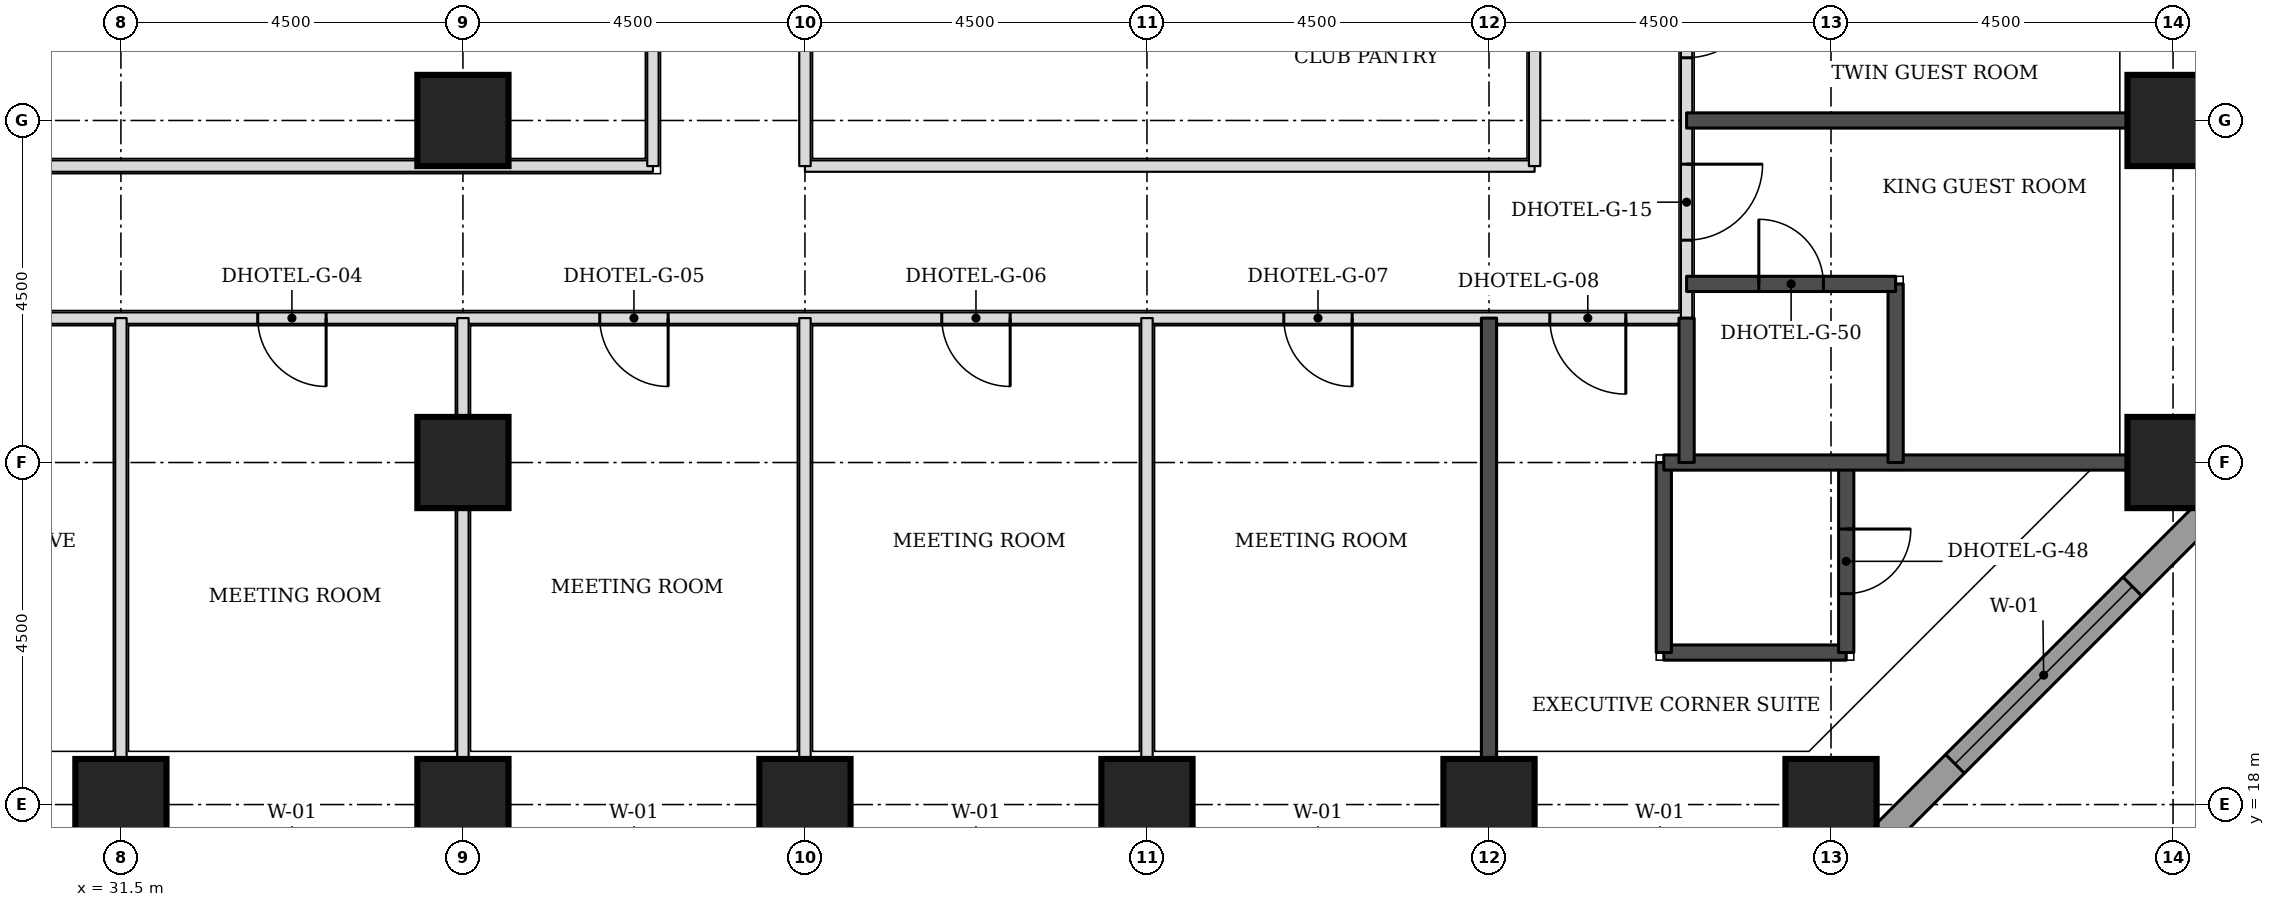
"""IFC4 building model, lengths in metres.
Left out: names, types, materials, properties, quantities, classifications, styles, units other than length and angle.
Written with IfcOpenShell. Run it as: python <this file> out.ifc"""

import sys

from ifc_helpers import new_model, si_unit, direction, frame, frame_2d, origin, origin_2d, place, context, subcontext, project, spatial, rectangle, extrude, element, fill, save


model = new_model("IFC4")
c1 = context("Model", 3, precision=1e-05, world=origin(), true_north=direction((0.0, 1.0)))
c2 = subcontext(c1, "Body", "Model", "MODEL_VIEW")
j1 = project(units=[si_unit("LENGTHUNIT", "METRE"), si_unit("PLANEANGLEUNIT", "RADIAN")], contexts=[c1])
p1 = place(None, origin())
s1 = spatial("IfcSite", under=j1, at=p1, CompositionType="ELEMENT")
p2 = place(p1, origin())
s2 = spatial("IfcBuilding", under=s1, at=p2, CompositionType="ELEMENT")
p3 = place(p2, frame((0.0, 0.0, 66.0)))
s3 = spatial("IfcBuildingStorey", under=s2, at=p3, CompositionType="ELEMENT", Elevation=66.0)
for number, where, z_axis, x_axis in (
    (1, (31.5, 18.0, 0.0), (0.0, 0.0, 1.0), (1.0, 0.0, 0.0)),
    (2, (36.0, 18.0, 0.0), (0.0, 0.0, 1.0), (1.0, 0.0, 0.0)),
    (3, (40.5, 18.0, 0.0), (0.0, 0.0, 1.0), (1.0, 0.0, 0.0)),
    (4, (45.0, 18.0, 0.0), (0.0, 0.0, 1.0), (1.0, 0.0, 0.0)),
    (5, (49.5, 18.0, 0.0), (0.0, 0.0, 1.0), (1.0, 0.0, 0.0)),
    (6, (54.0, 18.0, 0.0), (0.0, 0.0, 1.0), (1.0, 0.0, 0.0)),
    (7, (36.0, 22.5, 0.0), (0.0, 0.0, 1.0), (1.0, 0.0, 0.0)),
    (8, (58.5, 22.5, 0.0), (0.0, 0.0, 1.0), (1.0, 0.0, 0.0)),
    (9, (36.0, 27.0, 0.0), (0.0, 0.0, 1.0), (1.0, 0.0, 0.0)),
    (10, (58.5, 27.0, 0.0), (0.0, 0.0, 1.0), (1.0, 0.0, 0.0)),
):
    element("IfcColumn", number, at=place(p3, frame(where, z_axis=z_axis, x_axis=x_axis)), inside=s3, PredefinedType="COLUMN", context=c2, shape_type="SweptSolid", body=[
        extrude(rectangle(XDim=1.2, YDim=1.2, at=origin_2d()), origin(), (0.0, 0.0, 1.0), 3.3),
    ])
p4 = place(p3, frame((54.27, 17.174, 0.0), z_axis=(0.0, 0.0, 1.0), x_axis=(0.707106781187, 0.707106781187, 0.0)))
e11 = element("IfcWall", 11, at=p4, inside=s3, PredefinedType="STANDARD", context=c2, shape_type="SweptSolid", body=[
    extrude(rectangle(XDim=7.151, YDim=0.35, at=frame_2d((3.576, 0.0))), origin(), (0.0, 0.0, 1.0), 3.055),
])
p5 = place(p4, frame((1.926, 0.0, 0.8)))
e12 = element("IfcOpeningElement", 12, at=p5, cuts=e11, PredefinedType="OPENING", context=c2, shape_type="SweptSolid", body=[
    extrude(rectangle(XDim=3.3, YDim=1.5, at=frame_2d((1.65, 0.75))), frame((0.0, 0.185, 0.0), z_axis=(0.0, -1.0, 0.0), x_axis=(1.0, 0.0, 0.0)), (0.0, 0.0, 1.0), 0.37),
])
p6 = place(p3, frame((19.9, 24.4, 0.0), z_axis=(0.0, 0.0, 1.0), x_axis=(1.0, 0.0, 0.0)))
e13 = element("IfcWall", 13, at=p6, inside=s3, PredefinedType="PARTITIONING", context=c2, shape_type="SweptSolid", body=[
    extrude(rectangle(XDim=32.2, YDim=0.15, at=frame_2d((16.1, 0.0))), origin(), (0.0, 0.0, 1.0), 3.08),
])
p7 = place(p6, frame((4.4, 0.0, 0.0)))
e14 = element("IfcOpeningElement", 14, at=p7, cuts=e13, PredefinedType="OPENING", context=c2, shape_type="SweptSolid", body=[
    extrude(rectangle(XDim=0.9, YDim=2.1, at=frame_2d((0.45, 1.05))), frame((0.0, 0.085, 0.0), z_axis=(0.0, -1.0, 0.0), x_axis=(1.0, 0.0, 0.0)), (0.0, 0.0, 1.0), 0.17),
])
p8 = place(p6, frame((8.9, 0.0, 0.0)))
e15 = element("IfcOpeningElement", 15, at=p8, cuts=e13, PredefinedType="OPENING", context=c2, shape_type="SweptSolid", body=[
    extrude(rectangle(XDim=0.9, YDim=2.1, at=frame_2d((0.45, 1.05))), frame((0.0, 0.085, 0.0), z_axis=(0.0, -1.0, 0.0), x_axis=(1.0, 0.0, 0.0)), (0.0, 0.0, 1.0), 0.17),
])
p9 = place(p6, frame((13.4, 0.0, 0.0)))
e16 = element("IfcOpeningElement", 16, at=p9, cuts=e13, PredefinedType="OPENING", context=c2, shape_type="SweptSolid", body=[
    extrude(rectangle(XDim=0.9, YDim=2.1, at=frame_2d((0.45, 1.05))), frame((0.0, 0.085, 0.0), z_axis=(0.0, -1.0, 0.0), x_axis=(1.0, 0.0, 0.0)), (0.0, 0.0, 1.0), 0.17),
])
p10 = place(p6, frame((17.9, 0.0, 0.0)))
e17 = element("IfcOpeningElement", 17, at=p10, cuts=e13, PredefinedType="OPENING", context=c2, shape_type="SweptSolid", body=[
    extrude(rectangle(XDim=0.9, YDim=2.1, at=frame_2d((0.45, 1.05))), frame((0.0, 0.085, 0.0), z_axis=(0.0, -1.0, 0.0), x_axis=(1.0, 0.0, 0.0)), (0.0, 0.0, 1.0), 0.17),
])
p11 = place(p6, frame((22.4, 0.0, 0.0)))
e18 = element("IfcOpeningElement", 18, at=p11, cuts=e13, PredefinedType="OPENING", context=c2, shape_type="SweptSolid", body=[
    extrude(rectangle(XDim=0.9, YDim=2.1, at=frame_2d((0.45, 1.05))), frame((0.0, 0.085, 0.0), z_axis=(0.0, -1.0, 0.0), x_axis=(1.0, 0.0, 0.0)), (0.0, 0.0, 1.0), 0.17),
])
p12 = place(p6, frame((26.9, 0.0, 0.0)))
e19 = element("IfcOpeningElement", 19, at=p12, cuts=e13, PredefinedType="OPENING", context=c2, shape_type="SweptSolid", body=[
    extrude(rectangle(XDim=0.9, YDim=2.1, at=frame_2d((0.45, 1.05))), frame((0.0, 0.085, 0.0), z_axis=(0.0, -1.0, 0.0), x_axis=(1.0, 0.0, 0.0)), (0.0, 0.0, 1.0), 0.17),
])
p13 = place(p6, frame((0.8, 0.0, 0.0)))
e20 = element("IfcOpeningElement", 20, at=p13, cuts=e13, PredefinedType="OPENING", context=c2, shape_type="SweptSolid", body=[
    extrude(rectangle(XDim=1.0, YDim=2.1, at=frame_2d((0.5, 1.05))), frame((0.0, 0.085, 0.0), z_axis=(0.0, -1.0, 0.0), x_axis=(1.0, 0.0, 0.0)), (0.0, 0.0, 1.0), 0.17),
])
p14 = place(p6, frame((30.4, 0.0, 0.0)))
e21 = element("IfcOpeningElement", 21, at=p14, cuts=e13, PredefinedType="OPENING", context=c2, shape_type="SweptSolid", body=[
    extrude(rectangle(XDim=1.0, YDim=2.1, at=frame_2d((0.5, 1.05))), frame((0.0, 0.085, 0.0), z_axis=(0.0, -1.0, 0.0), x_axis=(1.0, 0.0, 0.0)), (0.0, 0.0, 1.0), 0.17),
])
p15 = place(p3, frame((52.1, 24.4, 0.0), z_axis=(0.0, 0.0, 1.0), x_axis=(0.0, 1.0, 0.0)))
e22 = element("IfcWall", 22, at=p15, inside=s3, PredefinedType="PARTITIONING", context=c2, shape_type="SweptSolid", body=[
    extrude(rectangle(XDim=23.1, YDim=0.15, at=frame_2d((11.55, 0.0))), origin(), (0.0, 0.0, 1.0), 3.08),
])
p16 = place(p15, frame((1.025, 0.0, 0.0)))
e23 = element("IfcOpeningElement", 23, at=p16, cuts=e22, PredefinedType="OPENING", context=c2, shape_type="SweptSolid", body=[
    extrude(rectangle(XDim=1.0, YDim=2.1, at=frame_2d((0.5, 1.05))), frame((0.0, 0.085, 0.0), z_axis=(0.0, -1.0, 0.0), x_axis=(1.0, 0.0, 0.0)), (0.0, 0.0, 1.0), 0.17),
])
p17 = place(p15, frame((3.425, 0.0, 0.0)))
e24 = element("IfcOpeningElement", 24, at=p17, cuts=e22, PredefinedType="OPENING", context=c2, shape_type="SweptSolid", body=[
    extrude(rectangle(XDim=1.0, YDim=2.1, at=frame_2d((0.5, 1.05))), frame((0.0, 0.085, 0.0), z_axis=(0.0, -1.0, 0.0), x_axis=(1.0, 0.0, 0.0)), (0.0, 0.0, 1.0), 0.17),
])
p18 = place(p15, frame((10.025, 0.0, 0.0)))
e25 = element("IfcOpeningElement", 25, at=p18, cuts=e22, PredefinedType="OPENING", context=c2, shape_type="SweptSolid", body=[
    extrude(rectangle(XDim=1.0, YDim=2.1, at=frame_2d((0.5, 1.05))), frame((0.0, 0.085, 0.0), z_axis=(0.0, -1.0, 0.0), x_axis=(1.0, 0.0, 0.0)), (0.0, 0.0, 1.0), 0.17),
])
p19 = place(p15, frame((12.425, 0.0, 0.0)))
e26 = element("IfcOpeningElement", 26, at=p19, cuts=e22, PredefinedType="OPENING", context=c2, shape_type="SweptSolid", body=[
    extrude(rectangle(XDim=1.0, YDim=2.1, at=frame_2d((0.5, 1.05))), frame((0.0, 0.085, 0.0), z_axis=(0.0, -1.0, 0.0), x_axis=(1.0, 0.0, 0.0)), (0.0, 0.0, 1.0), 0.17),
])
p20 = place(p15, frame((19.15, 0.0, 0.0)))
e27 = element("IfcOpeningElement", 27, at=p20, cuts=e22, PredefinedType="OPENING", context=c2, shape_type="SweptSolid", body=[
    extrude(rectangle(XDim=0.9, YDim=2.1, at=frame_2d((0.45, 1.05))), frame((0.0, 0.085, 0.0), z_axis=(0.0, -1.0, 0.0), x_axis=(1.0, 0.0, 0.0)), (0.0, 0.0, 1.0), 0.17),
])
p21 = place(p3, frame((27.0, 26.4, 0.0), z_axis=(0.0, 0.0, 1.0), x_axis=(1.0, 0.0, 0.0)))
e28 = element("IfcWall", 28, at=p21, inside=s3, PredefinedType="PARTITIONING", context=c2, shape_type="SweptSolid", body=[
    extrude(rectangle(XDim=11.5, YDim=0.15, at=frame_2d((5.75, 0.0))), origin(), (0.0, 0.0, 1.0), 3.08),
])
p22 = place(p3, frame((38.5, 26.4, 0.0), z_axis=(0.0, 0.0, 1.0), x_axis=(0.0, 1.0, 0.0)))
e29 = element("IfcWall", 29, at=p22, inside=s3, PredefinedType="PARTITIONING", context=c2, shape_type="SweptSolid", body=[
    extrude(rectangle(XDim=14.1, YDim=0.15, at=frame_2d((7.05, 0.0))), origin(), (0.0, 0.0, 1.0), 3.08),
])
p23 = place(p22, frame((6.6, 0.0, 0.0)))
e30 = element("IfcOpeningElement", 30, at=p23, cuts=e29, PredefinedType="OPENING", context=c2, shape_type="SweptSolid", body=[
    extrude(rectangle(XDim=0.9, YDim=2.1, at=frame_2d((0.45, 1.05))), frame((0.0, 0.085, 0.0), z_axis=(0.0, -1.0, 0.0), x_axis=(1.0, 0.0, 0.0)), (0.0, 0.0, 1.0), 0.17),
])
p24 = place(p3, frame((40.5, 26.4, 0.0), z_axis=(0.0, 0.0, 1.0), x_axis=(1.0, 0.0, 0.0)))
e31 = element("IfcWall", 31, at=p24, inside=s3, PredefinedType="PARTITIONING", context=c2, shape_type="SweptSolid", body=[
    extrude(rectangle(XDim=9.6, YDim=0.15, at=frame_2d((4.8, 0.0))), origin(), (0.0, 0.0, 1.0), 3.08),
])
for number, where, z_axis, x_axis in (
    (32, (40.5, 26.4, 0.0), (0.0, 0.0, 1.0), (0.0, 1.0, 0.0)),
    (33, (50.1, 26.4, 0.0), (0.0, 0.0, 1.0), (0.0, 1.0, 0.0)),
):
    element("IfcWall", number, at=place(p3, frame(where, z_axis=z_axis, x_axis=x_axis)), inside=s3, PredefinedType="PARTITIONING", context=c2, shape_type="SweptSolid", body=[
        extrude(rectangle(XDim=3.1, YDim=0.15, at=frame_2d((1.55, 0.0))), origin(), (0.0, 0.0, 1.0), 3.08),
    ])
p25 = place(p3, frame((49.5, 18.6, 0.0), z_axis=(0.0, 0.0, 1.0), x_axis=(0.0, 1.0, 0.0)))
e34 = element("IfcWall", 34, at=p25, inside=s3, PredefinedType="SOLIDWALL", context=c2, shape_type="SweptSolid", body=[
    extrude(rectangle(XDim=5.8, YDim=0.2, at=frame_2d((2.9, 0.0))), origin(), (0.0, 0.0, 1.0), 3.08),
])
p26 = place(p3, frame((51.8, 20.0, 0.0), z_axis=(0.0, 0.0, 1.0), x_axis=(1.0, 0.0, 0.0)))
e35 = element("IfcWall", 35, at=p26, inside=s3, PredefinedType="SOLIDWALL", context=c2, shape_type="SweptSolid", body=[
    extrude(rectangle(XDim=2.4, YDim=0.2, at=frame_2d((1.2, 0.0))), origin(), (0.0, 0.0, 1.0), 3.08),
])
p27 = place(p3, frame((51.8, 20.0, 0.0), z_axis=(0.0, 0.0, 1.0), x_axis=(0.0, 1.0, 0.0)))
e36 = element("IfcWall", 36, at=p27, inside=s3, PredefinedType="SOLIDWALL", context=c2, shape_type="SweptSolid", body=[
    extrude(rectangle(XDim=2.5, YDim=0.2, at=frame_2d((1.25, 0.0))), origin(), (0.0, 0.0, 1.0), 3.08),
])
p28 = place(p3, frame((54.2, 20.0, 0.0), z_axis=(0.0, 0.0, 1.0), x_axis=(0.0, 1.0, 0.0)))
e37 = element("IfcWall", 37, at=p28, inside=s3, PredefinedType="SOLIDWALL", context=c2, shape_type="SweptSolid", body=[
    extrude(rectangle(XDim=2.5, YDim=0.2, at=frame_2d((1.25, 0.0))), origin(), (0.0, 0.0, 1.0), 3.08),
])
p29 = place(p28, frame((0.775, 0.0, 0.0)))
e38 = element("IfcOpeningElement", 38, at=p29, cuts=e37, PredefinedType="OPENING", context=c2, shape_type="SweptSolid", body=[
    extrude(rectangle(XDim=0.85, YDim=2.1, at=frame_2d((0.425, 1.05))), frame((0.0, 0.11, 0.0), z_axis=(0.0, -1.0, 0.0), x_axis=(1.0, 0.0, 0.0)), (0.0, 0.0, 1.0), 0.22),
])
p30 = place(p3, frame((51.8, 22.5, 0.0), z_axis=(0.0, 0.0, 1.0), x_axis=(1.0, 0.0, 0.0)))
e39 = element("IfcWall", 39, at=p30, inside=s3, PredefinedType="SOLIDWALL", context=c2, shape_type="SweptSolid", body=[
    extrude(rectangle(XDim=6.1, YDim=0.2, at=frame_2d((3.05, 0.0))), origin(), (0.0, 0.0, 1.0), 3.08),
])
p31 = place(p3, frame((52.1, 22.5, 0.0), z_axis=(0.0, 0.0, 1.0), x_axis=(0.0, 1.0, 0.0)))
e40 = element("IfcWall", 40, at=p31, inside=s3, PredefinedType="SOLIDWALL", context=c2, shape_type="SweptSolid", body=[
    extrude(rectangle(XDim=1.9, YDim=0.2, at=frame_2d((0.95, 0.0))), origin(), (0.0, 0.0, 1.0), 3.08),
])
p32 = place(p3, frame((54.85, 22.5, 0.0), z_axis=(0.0, 0.0, 1.0), x_axis=(0.0, 1.0, 0.0)))
e41 = element("IfcWall", 41, at=p32, inside=s3, PredefinedType="SOLIDWALL", context=c2, shape_type="SweptSolid", body=[
    extrude(rectangle(XDim=2.35, YDim=0.2, at=frame_2d((1.175, 0.0))), origin(), (0.0, 0.0, 1.0), 3.08),
])
p33 = place(p3, frame((52.1, 24.85, 0.0), z_axis=(0.0, 0.0, 1.0), x_axis=(1.0, 0.0, 0.0)))
e42 = element("IfcWall", 42, at=p33, inside=s3, PredefinedType="SOLIDWALL", context=c2, shape_type="SweptSolid", body=[
    extrude(rectangle(XDim=2.75, YDim=0.2, at=frame_2d((1.375, 0.0))), origin(), (0.0, 0.0, 1.0), 3.08),
])
p34 = place(p33, frame((0.95, 0.0, 0.0)))
e43 = element("IfcOpeningElement", 43, at=p34, cuts=e42, PredefinedType="OPENING", context=c2, shape_type="SweptSolid", body=[
    extrude(rectangle(XDim=0.85, YDim=2.1, at=frame_2d((0.425, 1.05))), frame((0.0, 0.11, 0.0), z_axis=(0.0, -1.0, 0.0), x_axis=(1.0, 0.0, 0.0)), (0.0, 0.0, 1.0), 0.22),
])
p35 = place(p3, frame((52.1, 27.0, 0.0), z_axis=(0.0, 0.0, 1.0), x_axis=(1.0, 0.0, 0.0)))
e44 = element("IfcWall", 44, at=p35, inside=s3, PredefinedType="SOLIDWALL", context=c2, shape_type="SweptSolid", body=[
    extrude(rectangle(XDim=5.8, YDim=0.2, at=frame_2d((2.9, 0.0))), origin(), (0.0, 0.0, 1.0), 3.08),
])
p36 = place(p3, frame((31.5, 18.6, 0.0), z_axis=(0.0, 0.0, 1.0), x_axis=(0.0, 1.0, 0.0)))
e45 = element("IfcWall", 45, at=p36, inside=s3, PredefinedType="PARTITIONING", context=c2, shape_type="SweptSolid", body=[
    extrude(rectangle(XDim=5.8, YDim=0.15, at=frame_2d((2.9, 0.0))), origin(), (0.0, 0.0, 1.0), 3.08),
])
p37 = place(p3, frame((36.0, 18.6, 0.0), z_axis=(0.0, 0.0, 1.0), x_axis=(0.0, 1.0, 0.0)))
e46 = element("IfcWall", 46, at=p37, inside=s3, PredefinedType="PARTITIONING", context=c2, shape_type="SweptSolid", body=[
    extrude(rectangle(XDim=5.8, YDim=0.15, at=frame_2d((2.9, 0.0))), origin(), (0.0, 0.0, 1.0), 2.33),
])
for number, where, z_axis, x_axis in (
    (47, (40.5, 18.6, 0.0), (0.0, 0.0, 1.0), (0.0, 1.0, 0.0)),
    (48, (45.0, 18.6, 0.0), (0.0, 0.0, 1.0), (0.0, 1.0, 0.0)),
):
    element("IfcWall", number, at=place(p3, frame(where, z_axis=z_axis, x_axis=x_axis)), inside=s3, PredefinedType="PARTITIONING", context=c2, shape_type="SweptSolid", body=[
        extrude(rectangle(XDim=5.8, YDim=0.15, at=frame_2d((2.9, 0.0))), origin(), (0.0, 0.0, 1.0), 3.08),
    ])
p38 = place(p5, origin())
e49 = element("IfcWindow", 49, at=p38, inside=s3, PartitioningType="SINGLE_PANEL", PredefinedType="WINDOW", context=c2, shape_type="SweptSolid", body=[
    extrude(rectangle(XDim=3.3, YDim=1.5, at=frame_2d((1.65, 0.75))), frame((0.0, 0.085, 0.0), z_axis=(0.0, -1.0, 0.0), x_axis=(1.0, 0.0, 0.0)), (0.0, 0.0, 1.0), 0.06),
])
fill(e12, e49)
p39 = place(p9, frame((0.9, 0.0, 0.0), z_axis=(0.0, 0.0, 1.0), x_axis=(-1.0, 0.0, 0.0)))
e50 = element("IfcDoor", 50, at=p39, inside=s3, OperationType="SINGLE_SWING_LEFT", PredefinedType="DOOR", context=c2, shape_type="SweptSolid", body=[
    extrude(rectangle(XDim=0.9, YDim=2.1, at=frame_2d((0.45, 1.05))), frame((0.0, 0.025, 0.0), z_axis=(0.0, -1.0, 0.0), x_axis=(1.0, 0.0, 0.0)), (0.0, 0.0, 1.0), 0.05),
])
fill(e16, e50)
p40 = place(p10, frame((0.9, 0.0, 0.0), z_axis=(0.0, 0.0, 1.0), x_axis=(-1.0, 0.0, 0.0)))
e51 = element("IfcDoor", 51, at=p40, inside=s3, OperationType="SINGLE_SWING_LEFT", PredefinedType="DOOR", context=c2, shape_type="SweptSolid", body=[
    extrude(rectangle(XDim=0.9, YDim=2.1, at=frame_2d((0.45, 1.05))), frame((0.0, 0.025, 0.0), z_axis=(0.0, -1.0, 0.0), x_axis=(1.0, 0.0, 0.0)), (0.0, 0.0, 1.0), 0.05),
])
fill(e17, e51)
p41 = place(p11, frame((0.9, 0.0, 0.0), z_axis=(0.0, 0.0, 1.0), x_axis=(-1.0, 0.0, 0.0)))
e52 = element("IfcDoor", 52, at=p41, inside=s3, OperationType="SINGLE_SWING_LEFT", PredefinedType="DOOR", context=c2, shape_type="SweptSolid", body=[
    extrude(rectangle(XDim=0.9, YDim=2.1, at=frame_2d((0.45, 1.05))), frame((0.0, 0.025, 0.0), z_axis=(0.0, -1.0, 0.0), x_axis=(1.0, 0.0, 0.0)), (0.0, 0.0, 1.0), 0.05),
])
fill(e18, e52)
p42 = place(p12, frame((0.9, 0.0, 0.0), z_axis=(0.0, 0.0, 1.0), x_axis=(-1.0, 0.0, 0.0)))
e53 = element("IfcDoor", 53, at=p42, inside=s3, OperationType="SINGLE_SWING_LEFT", PredefinedType="DOOR", context=c2, shape_type="SweptSolid", body=[
    extrude(rectangle(XDim=0.9, YDim=2.1, at=frame_2d((0.45, 1.05))), frame((0.0, 0.025, 0.0), z_axis=(0.0, -1.0, 0.0), x_axis=(1.0, 0.0, 0.0)), (0.0, 0.0, 1.0), 0.05),
])
fill(e19, e53)
p43 = place(p16, frame((1.0, 0.0, 0.0), z_axis=(0.0, 0.0, 1.0), x_axis=(-1.0, 0.0, 0.0)))
e54 = element("IfcDoor", 54, at=p43, inside=s3, OperationType="SINGLE_SWING_LEFT", PredefinedType="DOOR", context=c2, shape_type="SweptSolid", body=[
    extrude(rectangle(XDim=1.0, YDim=2.1, at=frame_2d((0.5, 1.05))), frame((0.0, 0.025, 0.0), z_axis=(0.0, -1.0, 0.0), x_axis=(1.0, 0.0, 0.0)), (0.0, 0.0, 1.0), 0.05),
])
fill(e23, e54)
p44 = place(p34, origin())
e55 = element("IfcDoor", 55, at=p44, inside=s3, OperationType="SINGLE_SWING_LEFT", PredefinedType="DOOR", context=c2, shape_type="SweptSolid", body=[
    extrude(rectangle(XDim=0.85, YDim=2.1, at=frame_2d((0.425, 1.05))), frame((0.0, 0.025, 0.0), z_axis=(0.0, -1.0, 0.0), x_axis=(1.0, 0.0, 0.0)), (0.0, 0.0, 1.0), 0.05),
])
fill(e43, e55)
p45 = place(p17, frame((1.0, 0.0, 0.0), z_axis=(0.0, 0.0, 1.0), x_axis=(-1.0, 0.0, 0.0)))
e56 = element("IfcDoor", 56, at=p45, inside=s3, OperationType="SINGLE_SWING_LEFT", PredefinedType="DOOR", context=c2, shape_type="SweptSolid", body=[
    extrude(rectangle(XDim=1.0, YDim=2.1, at=frame_2d((0.5, 1.05))), frame((0.0, 0.025, 0.0), z_axis=(0.0, -1.0, 0.0), x_axis=(1.0, 0.0, 0.0)), (0.0, 0.0, 1.0), 0.05),
])
fill(e24, e56)
p46 = place(p14, frame((1.0, 0.0, 0.0), z_axis=(0.0, 0.0, 1.0), x_axis=(-1.0, 0.0, 0.0)))
e57 = element("IfcDoor", 57, at=p46, inside=s3, OperationType="SINGLE_SWING_LEFT", PredefinedType="DOOR", context=c2, shape_type="SweptSolid", body=[
    extrude(rectangle(XDim=1.0, YDim=2.1, at=frame_2d((0.5, 1.05))), frame((0.0, 0.025, 0.0), z_axis=(0.0, -1.0, 0.0), x_axis=(1.0, 0.0, 0.0)), (0.0, 0.0, 1.0), 0.05),
])
fill(e21, e57)
p47 = place(p29, frame((0.85, 0.0, 0.0), z_axis=(0.0, 0.0, 1.0), x_axis=(-1.0, 0.0, 0.0)))
e58 = element("IfcDoor", 58, at=p47, inside=s3, OperationType="SINGLE_SWING_LEFT", PredefinedType="DOOR", context=c2, shape_type="SweptSolid", body=[
    extrude(rectangle(XDim=0.85, YDim=2.1, at=frame_2d((0.425, 1.05))), frame((0.0, 0.025, 0.0), z_axis=(0.0, -1.0, 0.0), x_axis=(1.0, 0.0, 0.0)), (0.0, 0.0, 1.0), 0.05),
])
fill(e38, e58)
save(model, sys.argv[1])
